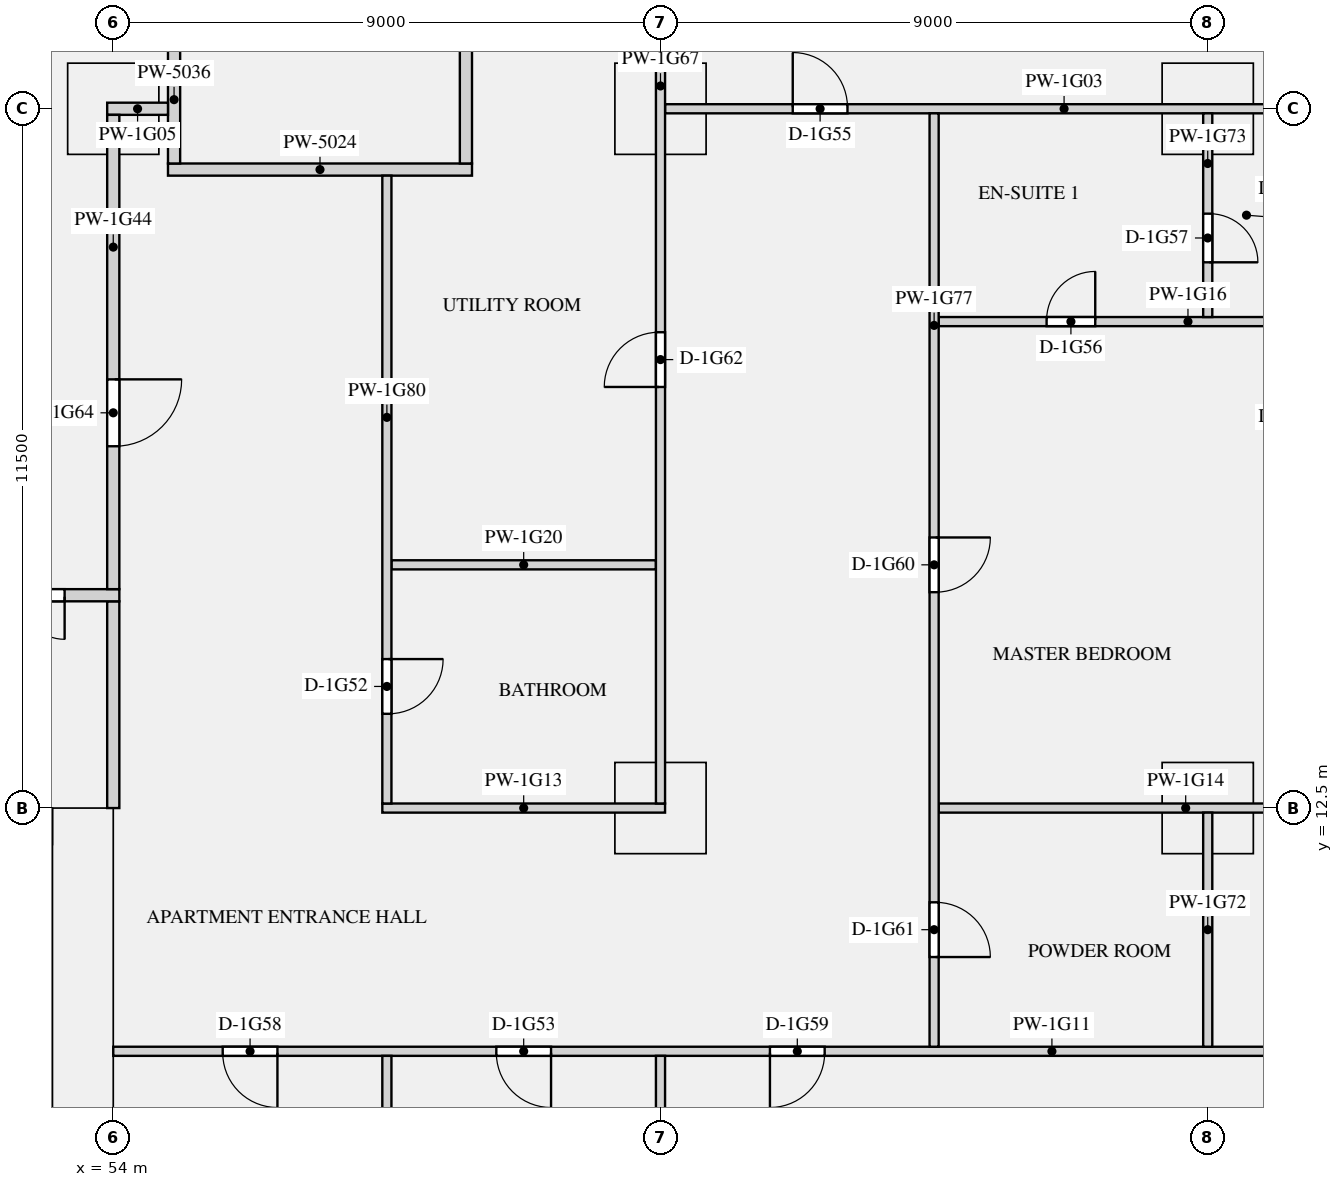
"""IFC4 building model, lengths in metres.
Left out: names, types, materials, properties, quantities, classifications, styles, units other than length and angle.
Written with IfcOpenShell. Run it as: python <this file> out.ifc"""

import sys

from ifc_helpers import new_model, si_unit, direction, frame, frame_2d, origin, origin_2d, place, context, subcontext, project, spatial, rectangle, extrude, element, fill, save


model = new_model("IFC4")
c1 = context("Model", 3, precision=1e-05, world=origin(), true_north=direction((0.0, 1.0)))
c2 = subcontext(c1, "Body", "Model", "MODEL_VIEW")
j1 = project(units=[si_unit("LENGTHUNIT", "METRE"), si_unit("PLANEANGLEUNIT", "RADIAN")], contexts=[c1])
p1 = place(None, origin())
s1 = spatial("IfcSite", under=j1, at=p1, CompositionType="ELEMENT")
p2 = place(p1, origin())
s2 = spatial("IfcBuilding", under=s1, at=p2, CompositionType="ELEMENT")
p3 = place(p2, frame((0.0, 0.0, 66.75)))
s3 = spatial("IfcBuildingStorey", under=s2, at=p3, CompositionType="ELEMENT", Elevation=66.75)
for number, where, z_axis, x_axis in (
    (1, (54.0, 24.0, 0.0), (0.0, 0.0, 1.0), (1.0, 0.0, 0.0)),
    (2, (63.0, 24.0, 0.0), (0.0, 0.0, 1.0), (1.0, 0.0, 0.0)),
    (3, (72.0, 24.0, 0.0), (0.0, 0.0, 1.0), (1.0, 0.0, 0.0)),
    (4, (63.0, 12.5, 0.0), (0.0, 0.0, 1.0), (1.0, 0.0, 0.0)),
    (5, (72.0, 12.5, 0.0), (0.0, 0.0, 1.0), (1.0, 0.0, 0.0)),
):
    element("IfcColumn", number, at=place(p3, frame(where, z_axis=z_axis, x_axis=x_axis)), inside=s3, PredefinedType="COLUMN", context=c2, shape_type="SweptSolid", body=[
        extrude(rectangle(XDim=1.5, YDim=1.5, at=origin_2d()), origin(), (0.0, 0.0, 1.0), 3.15),
    ])
p4 = place(p3, frame((53.5, 0.0, 0.0), z_axis=(0.0, 0.0, 1.0), x_axis=(0.0, 1.0, 0.0)))
e6 = element("IfcWall", 6, at=p4, inside=s3, PredefinedType="SHEAR", context=c2, shape_type="SweptSolid", body=[
    extrude(rectangle(XDim=12.5, YDim=1.0, at=frame_2d((6.25, 0.0))), origin(), (0.0, 0.0, 1.0), 3.15),
])
p5 = place(p3, frame((54.9, 23.0, 0.0), z_axis=(0.0, 0.0, 1.0), x_axis=(1.0, 0.0, 0.0)))
e7 = element("IfcWall", 7, at=p5, inside=s3, PredefinedType="PARTITIONING", context=c2, shape_type="SweptSolid", body=[
    extrude(rectangle(XDim=5.0, YDim=0.2, at=frame_2d((2.5, 0.0))), origin(), (0.0, 0.0, 1.0), 2.83),
])
p6 = place(p3, frame((54.0, 12.5, 0.0), z_axis=(0.0, 0.0, 1.0), x_axis=(0.0, 1.0, 0.0)))
e8 = element("IfcWall", 8, at=p6, inside=s3, PredefinedType="PARTITIONING", context=c2, shape_type="SweptSolid", body=[
    extrude(rectangle(XDim=3.4, YDim=0.2, at=frame_2d((1.7, 0.0))), origin(), (0.0, 0.0, 1.0), 2.83),
])
p7 = place(p3, frame((55.0, 23.1, 0.0), z_axis=(0.0, 0.0, 1.0), x_axis=(0.0, 1.0, 0.0)))
e9 = element("IfcWall", 9, at=p7, inside=s3, PredefinedType="PARTITIONING", context=c2, shape_type="SweptSolid", body=[
    extrude(rectangle(XDim=3.8, YDim=0.2, at=frame_2d((1.9, 0.0))), origin(), (0.0, 0.0, 1.0), 2.83),
])
p8 = place(p7, frame((2.1, 0.0, 0.0)))
e10 = element("IfcOpeningElement", 10, at=p8, cuts=e9, PredefinedType="OPENING", context=c2, shape_type="SweptSolid", body=[
    extrude(rectangle(XDim=1.2, YDim=2.1, at=frame_2d((0.6, 1.05))), frame((0.0, 0.11, 0.0), z_axis=(0.0, -1.0, 0.0), x_axis=(1.0, 0.0, 0.0)), (0.0, 0.0, 1.0), 0.22),
])
p9 = place(p3, frame((59.8, 23.1, 0.0), z_axis=(0.0, 0.0, 1.0), x_axis=(0.0, 1.0, 0.0)))
e11 = element("IfcWall", 11, at=p9, inside=s3, PredefinedType="PARTITIONING", context=c2, shape_type="SweptSolid", body=[
    extrude(rectangle(XDim=3.9, YDim=0.2, at=frame_2d((1.95, 0.0))), origin(), (0.0, 0.0, 1.0), 2.83),
])
p10 = place(p3, frame((63.075, 24.0, 0.0), z_axis=(0.0, 0.0, 1.0), x_axis=(1.0, 0.0, 0.0)))
e12 = element("IfcWall", 12, at=p10, inside=s3, PredefinedType="PARTITIONING", context=c2, shape_type="SweptSolid", body=[
    extrude(rectangle(XDim=10.125, YDim=0.15, at=frame_2d((5.062, 0.0))), origin(), (0.0, 0.0, 1.0), 2.83),
])
p11 = place(p10, frame((2.1, 0.0, 0.0)))
e13 = element("IfcOpeningElement", 13, at=p11, cuts=e12, PredefinedType="OPENING", context=c2, shape_type="SweptSolid", body=[
    extrude(rectangle(XDim=0.9, YDim=2.1, at=frame_2d((0.45, 1.05))), frame((0.0, 0.085, 0.0), z_axis=(0.0, -1.0, 0.0), x_axis=(1.0, 0.0, 0.0)), (0.0, 0.0, 1.0), 0.17),
])
p12 = place(p3, frame((53.9, 24.0, 0.0), z_axis=(0.0, 0.0, 1.0), x_axis=(1.0, 0.0, 0.0)))
e14 = element("IfcWall", 14, at=p12, inside=s3, PredefinedType="PARTITIONING", context=c2, shape_type="SweptSolid", body=[
    extrude(rectangle(XDim=1.0, YDim=0.2, at=frame_2d((0.5, 0.0))), origin(), (0.0, 0.0, 1.0), 2.83),
])
p13 = place(p3, frame((54.0, 8.5, 0.0), z_axis=(0.0, 0.0, 1.0), x_axis=(1.0, 0.0, 0.0)))
e15 = element("IfcWall", 15, at=p13, inside=s3, PredefinedType="PARTITIONING", context=c2, shape_type="SweptSolid", body=[
    extrude(rectangle(XDim=21.7, YDim=0.15, at=frame_2d((10.85, 0.0))), origin(), (0.0, 0.0, 1.0), 2.83),
])
p14 = place(p13, frame((6.3, 0.0, 0.0)))
e16 = element("IfcOpeningElement", 16, at=p14, cuts=e15, PredefinedType="OPENING", context=c2, shape_type="SweptSolid", body=[
    extrude(rectangle(XDim=0.9, YDim=2.1, at=frame_2d((0.45, 1.05))), frame((0.0, 0.085, 0.0), z_axis=(0.0, -1.0, 0.0), x_axis=(1.0, 0.0, 0.0)), (0.0, 0.0, 1.0), 0.17),
])
p15 = place(p13, frame((1.8, 0.0, 0.0)))
e17 = element("IfcOpeningElement", 17, at=p15, cuts=e15, PredefinedType="OPENING", context=c2, shape_type="SweptSolid", body=[
    extrude(rectangle(XDim=0.9, YDim=2.1, at=frame_2d((0.45, 1.05))), frame((0.0, 0.085, 0.0), z_axis=(0.0, -1.0, 0.0), x_axis=(1.0, 0.0, 0.0)), (0.0, 0.0, 1.0), 0.17),
])
p16 = place(p13, frame((10.8, 0.0, 0.0)))
e18 = element("IfcOpeningElement", 18, at=p16, cuts=e15, PredefinedType="OPENING", context=c2, shape_type="SweptSolid", body=[
    extrude(rectangle(XDim=0.9, YDim=2.1, at=frame_2d((0.45, 1.05))), frame((0.0, 0.085, 0.0), z_axis=(0.0, -1.0, 0.0), x_axis=(1.0, 0.0, 0.0)), (0.0, 0.0, 1.0), 0.17),
])
p17 = place(p13, frame((19.175, 0.0, 0.0)))
e19 = element("IfcOpeningElement", 19, at=p17, cuts=e15, PredefinedType="OPENING", context=c2, shape_type="SweptSolid", body=[
    extrude(rectangle(XDim=1.5, YDim=2.1, at=frame_2d((0.75, 1.05))), frame((0.0, 0.085, 0.0), z_axis=(0.0, -1.0, 0.0), x_axis=(1.0, 0.0, 0.0)), (0.0, 0.0, 1.0), 0.17),
])
p18 = place(p3, frame((58.425, 12.5, 0.0), z_axis=(0.0, 0.0, 1.0), x_axis=(1.0, 0.0, 0.0)))
e20 = element("IfcWall", 20, at=p18, inside=s3, PredefinedType="PARTITIONING", context=c2, shape_type="SweptSolid", body=[
    extrude(rectangle(XDim=4.65, YDim=0.15, at=frame_2d((2.325, 0.0))), origin(), (0.0, 0.0, 1.0), 2.83),
])
p19 = place(p3, frame((67.575, 12.5, 0.0), z_axis=(0.0, 0.0, 1.0), x_axis=(1.0, 0.0, 0.0)))
e21 = element("IfcWall", 21, at=p19, inside=s3, PredefinedType="PARTITIONING", context=c2, shape_type="SweptSolid", body=[
    extrude(rectangle(XDim=8.125, YDim=0.15, at=frame_2d((4.062, 0.0))), origin(), (0.0, 0.0, 1.0), 2.83),
])
p20 = place(p3, frame((67.575, 20.5, 0.0), z_axis=(0.0, 0.0, 1.0), x_axis=(1.0, 0.0, 0.0)))
e22 = element("IfcWall", 22, at=p20, inside=s3, PredefinedType="PARTITIONING", context=c2, shape_type="SweptSolid", body=[
    extrude(rectangle(XDim=5.625, YDim=0.15, at=frame_2d((2.812, 0.0))), origin(), (0.0, 0.0, 1.0), 2.83),
])
p21 = place(p20, frame((1.775, 0.0, 0.0)))
e23 = element("IfcOpeningElement", 23, at=p21, cuts=e22, PredefinedType="OPENING", context=c2, shape_type="SweptSolid", body=[
    extrude(rectangle(XDim=0.8, YDim=2.1, at=frame_2d((0.4, 1.05))), frame((0.0, 0.085, 0.0), z_axis=(0.0, -1.0, 0.0), x_axis=(1.0, 0.0, 0.0)), (0.0, 0.0, 1.0), 0.17),
])
p22 = place(p3, frame((58.575, 16.5, 0.0), z_axis=(0.0, 0.0, 1.0), x_axis=(1.0, 0.0, 0.0)))
e24 = element("IfcWall", 24, at=p22, inside=s3, PredefinedType="PARTITIONING", context=c2, shape_type="SweptSolid", body=[
    extrude(rectangle(XDim=4.35, YDim=0.15, at=frame_2d((2.175, 0.0))), origin(), (0.0, 0.0, 1.0), 2.83),
])
p23 = place(p3, frame((17.9, 16.0, 0.0), z_axis=(0.0, 0.0, 1.0), x_axis=(1.0, 0.0, 0.0)))
e25 = element("IfcWall", 25, at=p23, inside=s3, PredefinedType="PARTITIONING", context=c2, shape_type="SweptSolid", body=[
    extrude(rectangle(XDim=36.2, YDim=0.2, at=frame_2d((18.1, 0.0))), origin(), (0.0, 0.0, 1.0), 2.83),
])
p24 = place(p23, frame((0.9, 0.0, 0.0)))
e26 = element("IfcOpeningElement", 26, at=p24, cuts=e25, PredefinedType="OPENING", context=c2, shape_type="SweptSolid", body=[
    extrude(rectangle(XDim=1.4, YDim=2.1, at=frame_2d((0.7, 1.05))), frame((0.0, 0.11, 0.0), z_axis=(0.0, -1.0, 0.0), x_axis=(1.0, 0.0, 0.0)), (0.0, 0.0, 1.0), 0.22),
])
p25 = place(p23, frame((33.9, 0.0, 0.0)))
e27 = element("IfcOpeningElement", 27, at=p25, cuts=e25, PredefinedType="OPENING", context=c2, shape_type="SweptSolid", body=[
    extrude(rectangle(XDim=1.4, YDim=2.1, at=frame_2d((0.7, 1.05))), frame((0.0, 0.11, 0.0), z_axis=(0.0, -1.0, 0.0), x_axis=(1.0, 0.0, 0.0)), (0.0, 0.0, 1.0), 0.22),
])
p26 = place(p3, frame((54.0, 16.1, 0.0), z_axis=(0.0, 0.0, 1.0), x_axis=(0.0, 1.0, 0.0)))
e28 = element("IfcWall", 28, at=p26, inside=s3, PredefinedType="PARTITIONING", context=c2, shape_type="SweptSolid", body=[
    extrude(rectangle(XDim=7.8, YDim=0.2, at=frame_2d((3.9, 0.0))), origin(), (0.0, 0.0, 1.0), 2.83),
])
p27 = place(p26, frame((2.35, 0.0, 0.0)))
e29 = element("IfcOpeningElement", 29, at=p27, cuts=e28, PredefinedType="OPENING", context=c2, shape_type="SweptSolid", body=[
    extrude(rectangle(XDim=1.1, YDim=2.1, at=frame_2d((0.55, 1.05))), frame((0.0, 0.11, 0.0), z_axis=(0.0, -1.0, 0.0), x_axis=(1.0, 0.0, 0.0)), (0.0, 0.0, 1.0), 0.22),
])
p28 = place(p3, frame((63.0, 0.8, 0.0), z_axis=(0.0, 0.0, 1.0), x_axis=(0.0, 1.0, 0.0)))
e30 = element("IfcWall", 30, at=p28, inside=s3, PredefinedType="PARTITIONING", context=c2, shape_type="SweptSolid", body=[
    extrude(rectangle(XDim=7.625, YDim=0.15, at=frame_2d((3.812, 0.0))), origin(), (0.0, 0.0, 1.0), 2.83),
])
p29 = place(p3, frame((63.0, 12.575, 0.0), z_axis=(0.0, 0.0, 1.0), x_axis=(0.0, 1.0, 0.0)))
e31 = element("IfcWall", 31, at=p29, inside=s3, PredefinedType="PARTITIONING", context=c2, shape_type="SweptSolid", body=[
    extrude(rectangle(XDim=15.85, YDim=0.15, at=frame_2d((7.925, 0.0))), origin(), (0.0, 0.0, 1.0), 2.83),
])
p30 = place(p29, frame((6.85, 0.0, 0.0)))
e32 = element("IfcOpeningElement", 32, at=p30, cuts=e31, PredefinedType="OPENING", context=c2, shape_type="SweptSolid", body=[
    extrude(rectangle(XDim=0.9, YDim=2.1, at=frame_2d((0.45, 1.05))), frame((0.0, 0.085, 0.0), z_axis=(0.0, -1.0, 0.0), x_axis=(1.0, 0.0, 0.0)), (0.0, 0.0, 1.0), 0.17),
])
p31 = place(p3, frame((72.0, 8.575, 0.0), z_axis=(0.0, 0.0, 1.0), x_axis=(0.0, 1.0, 0.0)))
e33 = element("IfcWall", 33, at=p31, inside=s3, PredefinedType="PARTITIONING", context=c2, shape_type="SweptSolid", body=[
    extrude(rectangle(XDim=3.85, YDim=0.15, at=frame_2d((1.925, 0.0))), origin(), (0.0, 0.0, 1.0), 2.83),
])
p32 = place(p3, frame((72.0, 20.575, 0.0), z_axis=(0.0, 0.0, 1.0), x_axis=(0.0, 1.0, 0.0)))
e34 = element("IfcWall", 34, at=p32, inside=s3, PredefinedType="PARTITIONING", context=c2, shape_type="SweptSolid", body=[
    extrude(rectangle(XDim=3.35, YDim=0.15, at=frame_2d((1.675, 0.0))), origin(), (0.0, 0.0, 1.0), 2.83),
])
p33 = place(p32, frame((0.9, 0.0, 0.0)))
e35 = element("IfcOpeningElement", 35, at=p33, cuts=e34, PredefinedType="OPENING", context=c2, shape_type="SweptSolid", body=[
    extrude(rectangle(XDim=0.8, YDim=2.1, at=frame_2d((0.4, 1.05))), frame((0.0, 0.085, 0.0), z_axis=(0.0, -1.0, 0.0), x_axis=(1.0, 0.0, 0.0)), (0.0, 0.0, 1.0), 0.17),
])
p34 = place(p3, frame((67.5, 8.575, 0.0), z_axis=(0.0, 0.0, 1.0), x_axis=(0.0, 1.0, 0.0)))
e36 = element("IfcWall", 36, at=p34, inside=s3, PredefinedType="PARTITIONING", context=c2, shape_type="SweptSolid", body=[
    extrude(rectangle(XDim=15.35, YDim=0.15, at=frame_2d((7.675, 0.0))), origin(), (0.0, 0.0, 1.0), 2.83),
])
p35 = place(p34, frame((7.475, 0.0, 0.0)))
e37 = element("IfcOpeningElement", 37, at=p35, cuts=e36, PredefinedType="OPENING", context=c2, shape_type="SweptSolid", body=[
    extrude(rectangle(XDim=0.9, YDim=2.1, at=frame_2d((0.45, 1.05))), frame((0.0, 0.085, 0.0), z_axis=(0.0, -1.0, 0.0), x_axis=(1.0, 0.0, 0.0)), (0.0, 0.0, 1.0), 0.17),
])
p36 = place(p34, frame((1.475, 0.0, 0.0)))
e38 = element("IfcOpeningElement", 38, at=p36, cuts=e36, PredefinedType="OPENING", context=c2, shape_type="SweptSolid", body=[
    extrude(rectangle(XDim=0.9, YDim=2.1, at=frame_2d((0.45, 1.05))), frame((0.0, 0.085, 0.0), z_axis=(0.0, -1.0, 0.0), x_axis=(1.0, 0.0, 0.0)), (0.0, 0.0, 1.0), 0.17),
])
p37 = place(p3, frame((58.5, 0.8, 0.0), z_axis=(0.0, 0.0, 1.0), x_axis=(0.0, 1.0, 0.0)))
e39 = element("IfcWall", 39, at=p37, inside=s3, PredefinedType="PARTITIONING", context=c2, shape_type="SweptSolid", body=[
    extrude(rectangle(XDim=7.625, YDim=0.15, at=frame_2d((3.812, 0.0))), origin(), (0.0, 0.0, 1.0), 2.83),
])
p38 = place(p3, frame((58.5, 12.575, 0.0), z_axis=(0.0, 0.0, 1.0), x_axis=(0.0, 1.0, 0.0)))
e40 = element("IfcWall", 40, at=p38, inside=s3, PredefinedType="PARTITIONING", context=c2, shape_type="SweptSolid", body=[
    extrude(rectangle(XDim=10.325, YDim=0.15, at=frame_2d((5.163, 0.0))), origin(), (0.0, 0.0, 1.0), 2.83),
])
p39 = place(p38, frame((1.475, 0.0, 0.0)))
e41 = element("IfcOpeningElement", 41, at=p39, cuts=e40, PredefinedType="OPENING", context=c2, shape_type="SweptSolid", body=[
    extrude(rectangle(XDim=0.9, YDim=2.1, at=frame_2d((0.45, 1.05))), frame((0.0, 0.085, 0.0), z_axis=(0.0, -1.0, 0.0), x_axis=(1.0, 0.0, 0.0)), (0.0, 0.0, 1.0), 0.17),
])
p40 = place(p25, frame((1.4, 0.0, 0.0), z_axis=(0.0, 0.0, 1.0), x_axis=(-1.0, 0.0, 0.0)))
e42 = element("IfcDoor", 42, at=p40, inside=s3, OperationType="DOUBLE_DOOR_SINGLE_SWING", PredefinedType="DOOR", context=c2, shape_type="SweptSolid", body=[
    extrude(rectangle(XDim=1.4, YDim=2.1, at=frame_2d((0.7, 1.05))), frame((0.0, 0.025, 0.0), z_axis=(0.0, -1.0, 0.0), x_axis=(1.0, 0.0, 0.0)), (0.0, 0.0, 1.0), 0.05),
])
fill(e27, e42)
p41 = place(p39, frame((0.9, 0.0, 0.0), z_axis=(0.0, 0.0, 1.0), x_axis=(-1.0, 0.0, 0.0)))
e43 = element("IfcDoor", 43, at=p41, inside=s3, OperationType="SINGLE_SWING_LEFT", PredefinedType="DOOR", context=c2, shape_type="SweptSolid", body=[
    extrude(rectangle(XDim=0.9, YDim=2.1, at=frame_2d((0.45, 1.05))), frame((0.0, 0.025, 0.0), z_axis=(0.0, -1.0, 0.0), x_axis=(1.0, 0.0, 0.0)), (0.0, 0.0, 1.0), 0.05),
])
fill(e41, e43)
p42 = place(p14, frame((0.9, 0.0, 0.0), z_axis=(0.0, 0.0, 1.0), x_axis=(-1.0, 0.0, 0.0)))
e44 = element("IfcDoor", 44, at=p42, inside=s3, OperationType="SINGLE_SWING_LEFT", PredefinedType="DOOR", context=c2, shape_type="SweptSolid", body=[
    extrude(rectangle(XDim=0.9, YDim=2.1, at=frame_2d((0.45, 1.05))), frame((0.0, 0.025, 0.0), z_axis=(0.0, -1.0, 0.0), x_axis=(1.0, 0.0, 0.0)), (0.0, 0.0, 1.0), 0.05),
])
fill(e16, e44)
p43 = place(p11, origin())
e45 = element("IfcDoor", 45, at=p43, inside=s3, OperationType="SINGLE_SWING_LEFT", PredefinedType="DOOR", context=c2, shape_type="SweptSolid", body=[
    extrude(rectangle(XDim=0.9, YDim=2.1, at=frame_2d((0.45, 1.05))), frame((0.0, 0.025, 0.0), z_axis=(0.0, -1.0, 0.0), x_axis=(1.0, 0.0, 0.0)), (0.0, 0.0, 1.0), 0.05),
])
fill(e13, e45)
p44 = place(p21, origin())
e46 = element("IfcDoor", 46, at=p44, inside=s3, OperationType="SINGLE_SWING_RIGHT", PredefinedType="DOOR", context=c2, shape_type="SweptSolid", body=[
    extrude(rectangle(XDim=0.8, YDim=2.1, at=frame_2d((0.4, 1.05))), frame((0.0, 0.025, 0.0), z_axis=(0.0, -1.0, 0.0), x_axis=(1.0, 0.0, 0.0)), (0.0, 0.0, 1.0), 0.05),
])
fill(e23, e46)
p45 = place(p33, frame((0.8, 0.0, 0.0), z_axis=(0.0, 0.0, 1.0), x_axis=(-1.0, 0.0, 0.0)))
e47 = element("IfcDoor", 47, at=p45, inside=s3, OperationType="SINGLE_SWING_RIGHT", PredefinedType="DOOR", context=c2, shape_type="SweptSolid", body=[
    extrude(rectangle(XDim=0.8, YDim=2.1, at=frame_2d((0.4, 1.05))), frame((0.0, 0.025, 0.0), z_axis=(0.0, -1.0, 0.0), x_axis=(1.0, 0.0, 0.0)), (0.0, 0.0, 1.0), 0.05),
])
fill(e35, e47)
p46 = place(p15, frame((0.9, 0.0, 0.0), z_axis=(0.0, 0.0, 1.0), x_axis=(-1.0, 0.0, 0.0)))
e48 = element("IfcDoor", 48, at=p46, inside=s3, OperationType="SINGLE_SWING_LEFT", PredefinedType="DOOR", context=c2, shape_type="SweptSolid", body=[
    extrude(rectangle(XDim=0.9, YDim=2.1, at=frame_2d((0.45, 1.05))), frame((0.0, 0.025, 0.0), z_axis=(0.0, -1.0, 0.0), x_axis=(1.0, 0.0, 0.0)), (0.0, 0.0, 1.0), 0.05),
])
fill(e17, e48)
p47 = place(p16, frame((0.9, 0.0, 0.0), z_axis=(0.0, 0.0, 1.0), x_axis=(-1.0, 0.0, 0.0)))
e49 = element("IfcDoor", 49, at=p47, inside=s3, OperationType="SINGLE_SWING_RIGHT", PredefinedType="DOOR", context=c2, shape_type="SweptSolid", body=[
    extrude(rectangle(XDim=0.9, YDim=2.1, at=frame_2d((0.45, 1.05))), frame((0.0, 0.025, 0.0), z_axis=(0.0, -1.0, 0.0), x_axis=(1.0, 0.0, 0.0)), (0.0, 0.0, 1.0), 0.05),
])
fill(e18, e49)
p48 = place(p35, frame((0.9, 0.0, 0.0), z_axis=(0.0, 0.0, 1.0), x_axis=(-1.0, 0.0, 0.0)))
e50 = element("IfcDoor", 50, at=p48, inside=s3, OperationType="SINGLE_SWING_LEFT", PredefinedType="DOOR", context=c2, shape_type="SweptSolid", body=[
    extrude(rectangle(XDim=0.9, YDim=2.1, at=frame_2d((0.45, 1.05))), frame((0.0, 0.025, 0.0), z_axis=(0.0, -1.0, 0.0), x_axis=(1.0, 0.0, 0.0)), (0.0, 0.0, 1.0), 0.05),
])
fill(e37, e50)
p49 = place(p36, frame((0.9, 0.0, 0.0), z_axis=(0.0, 0.0, 1.0), x_axis=(-1.0, 0.0, 0.0)))
e51 = element("IfcDoor", 51, at=p49, inside=s3, OperationType="SINGLE_SWING_RIGHT", PredefinedType="DOOR", context=c2, shape_type="SweptSolid", body=[
    extrude(rectangle(XDim=0.9, YDim=2.1, at=frame_2d((0.45, 1.05))), frame((0.0, 0.025, 0.0), z_axis=(0.0, -1.0, 0.0), x_axis=(1.0, 0.0, 0.0)), (0.0, 0.0, 1.0), 0.05),
])
fill(e38, e51)
p50 = place(p30, origin())
e52 = element("IfcDoor", 52, at=p50, inside=s3, OperationType="SINGLE_SWING_LEFT", PredefinedType="DOOR", context=c2, shape_type="SweptSolid", body=[
    extrude(rectangle(XDim=0.9, YDim=2.1, at=frame_2d((0.45, 1.05))), frame((0.0, 0.025, 0.0), z_axis=(0.0, -1.0, 0.0), x_axis=(1.0, 0.0, 0.0)), (0.0, 0.0, 1.0), 0.05),
])
fill(e32, e52)
p51 = place(p27, frame((1.1, 0.0, 0.0), z_axis=(0.0, 0.0, 1.0), x_axis=(-1.0, 0.0, 0.0)))
e53 = element("IfcDoor", 53, at=p51, inside=s3, OperationType="SINGLE_SWING_LEFT", PredefinedType="DOOR", context=c2, shape_type="SweptSolid", body=[
    extrude(rectangle(XDim=1.1, YDim=2.1, at=frame_2d((0.55, 1.05))), frame((0.0, 0.025, 0.0), z_axis=(0.0, -1.0, 0.0), x_axis=(1.0, 0.0, 0.0)), (0.0, 0.0, 1.0), 0.05),
])
fill(e29, e53)
save(model, sys.argv[1])
